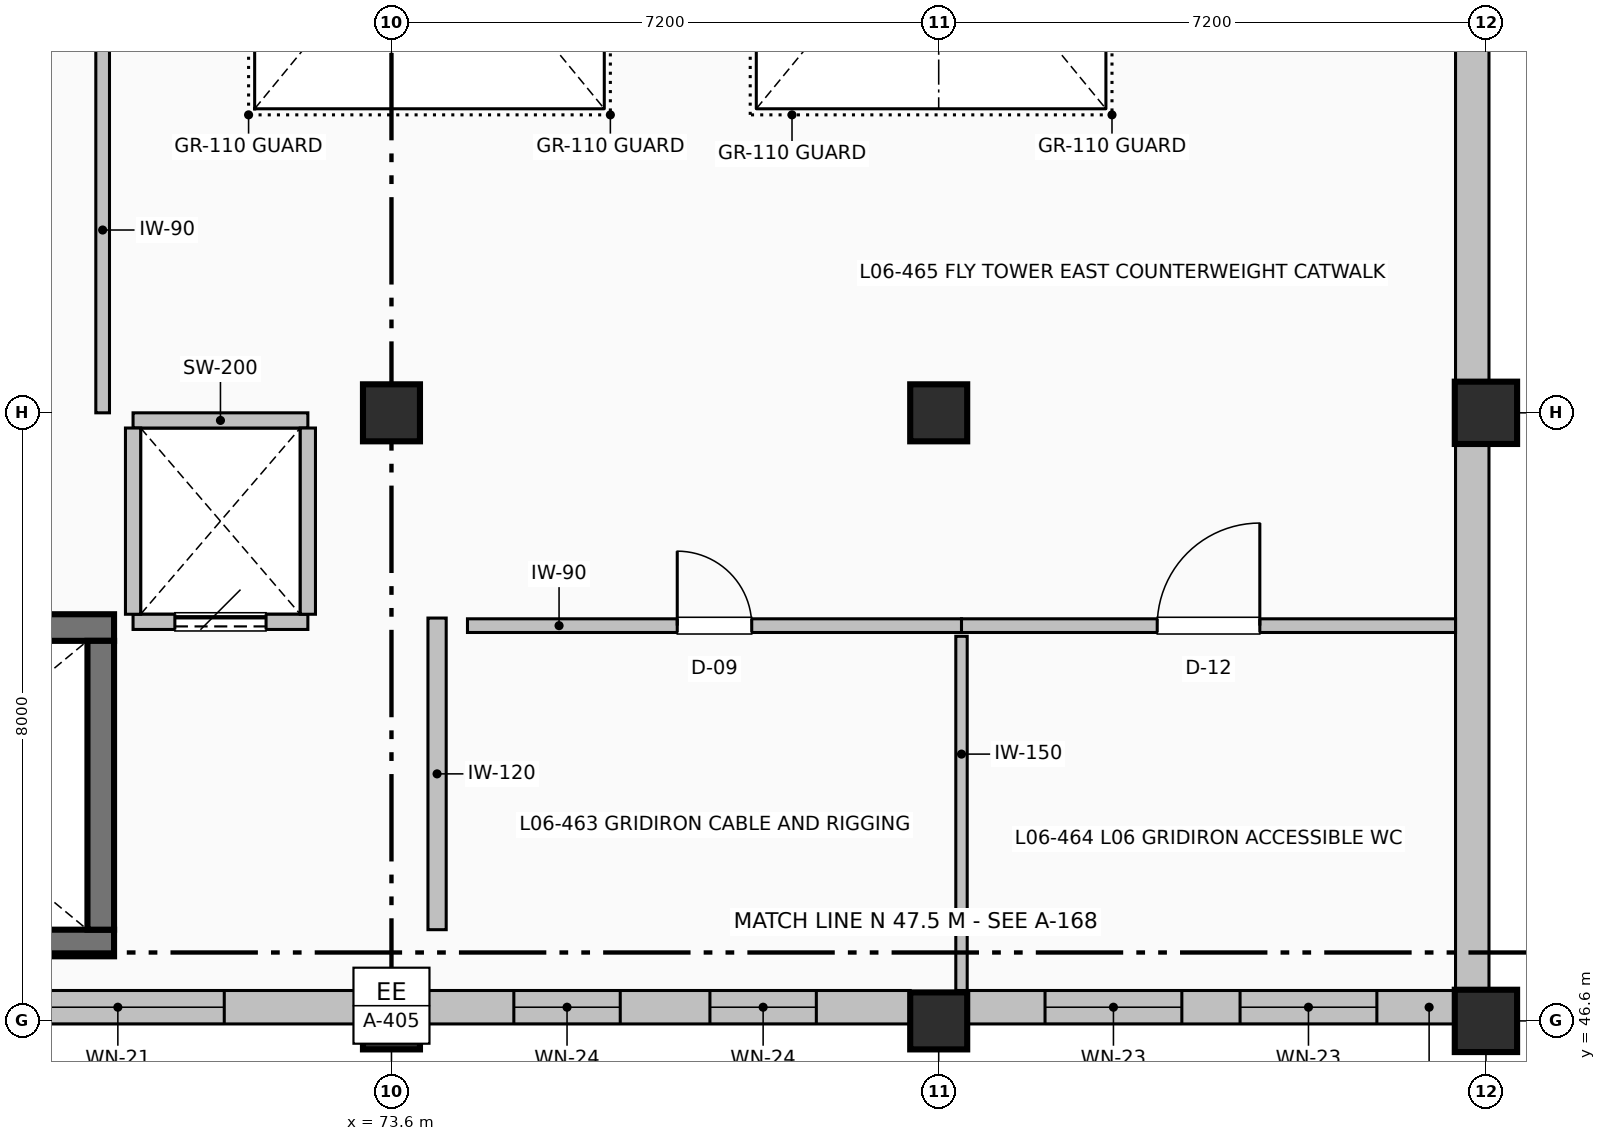
"""IFC4 building model, lengths in metres.
Left out: names, types, materials, properties, quantities, classifications, styles, units other than length and angle.
Written with IfcOpenShell. Run it as: python <this file> out.ifc"""

import sys

from ifc_helpers import new_model, si_unit, direction, frame, frame_2d, origin, origin_2d, place, context, subcontext, project, spatial, rectangle, extrude, element, fill, save


model = new_model("IFC4")
c1 = context("Model", 3, precision=1e-05, world=origin(), true_north=direction((0.0, 1.0)))
c2 = subcontext(c1, "Body", "Model", "MODEL_VIEW")
j1 = project(units=[si_unit("LENGTHUNIT", "METRE"), si_unit("PLANEANGLEUNIT", "RADIAN")], contexts=[c1])
p1 = place(None, origin())
s1 = spatial("IfcSite", under=j1, at=p1, CompositionType="ELEMENT")
p2 = place(p1, origin())
s2 = spatial("IfcBuilding", under=s1, at=p2, CompositionType="ELEMENT")
p3 = place(p2, frame((0.0, 0.0, 28.5)))
s3 = spatial("IfcBuildingStorey", under=s2, at=p3, CompositionType="ELEMENT", Elevation=28.5)
for number, where, z_axis, x_axis in (
    (1, (73.6, 46.6, 0.0), (0.0, 0.0, 1.0), (1.0, 0.0, 0.0)),
    (2, (73.6, 54.6, 0.0), (0.0, 0.0, 1.0), (1.0, 0.0, 0.0)),
    (3, (80.8, 46.6, 0.0), (0.0, 0.0, 1.0), (1.0, 0.0, 0.0)),
    (4, (80.8, 54.6, 0.0), (0.0, 0.0, 1.0), (1.0, 0.0, 0.0)),
):
    element("IfcColumn", number, at=place(p3, frame(where, z_axis=z_axis, x_axis=x_axis)), inside=s3, PredefinedType="COLUMN", context=c2, shape_type="SweptSolid", body=[
        extrude(rectangle(XDim=0.75, YDim=0.75, at=origin_2d()), origin(), (0.0, 0.0, 1.0), 5.1),
    ])
for number, where, z_axis, x_axis in (
    (5, (88.0, 46.6, 0.0), (0.0, 0.0, 1.0), (1.0, 0.0, 0.0)),
    (6, (88.0, 54.6, 0.0), (0.0, 0.0, 1.0), (1.0, 0.0, 0.0)),
):
    element("IfcColumn", number, at=place(p3, frame(where, z_axis=z_axis, x_axis=x_axis)), inside=s3, PredefinedType="COLUMN", context=c2, shape_type="SweptSolid", body=[
        extrude(rectangle(XDim=0.82, YDim=0.82, at=origin_2d()), origin(), (0.0, 0.0, 1.0), 5.1),
    ])
for number, where, z_axis, x_axis in (
    (7, (61.45, 47.625, 0.0), (0.0, 0.0, 1.0), (1.0, 0.0, 0.0)),
    (8, (69.95, 51.775, 0.0), (0.0, 0.0, 1.0), (-1.0, 0.0, 0.0)),
):
    element("IfcWall", number, at=place(p3, frame(where, z_axis=z_axis, x_axis=x_axis)), inside=s3, PredefinedType="SHEAR", context=c2, shape_type="SweptSolid", body=[
        extrude(rectangle(XDim=8.5, YDim=0.35, at=frame_2d((4.25, 0.0))), origin(), (0.0, 0.0, 1.0), 4.8),
    ])
p4 = place(p3, frame((69.775, 51.6, 0.0), z_axis=(0.0, 0.0, 1.0), x_axis=(0.0, -1.0, 0.0)))
e9 = element("IfcWall", 9, at=p4, inside=s3, PredefinedType="SHEAR", context=c2, shape_type="SweptSolid", body=[
    extrude(rectangle(XDim=3.8, YDim=0.35, at=frame_2d((1.9, 0.0))), origin(), (0.0, 0.0, 1.0), 4.8),
])
p5 = place(p3, frame((87.82, 62.09, 0.0), z_axis=(0.0, 0.0, 1.0), x_axis=(0.0, -1.0, 0.0)))
e10 = element("IfcWall", 10, at=p5, inside=s3, PredefinedType="SOLIDWALL", context=c2, shape_type="SweptSolid", body=[
    extrude(rectangle(XDim=7.08, YDim=0.44, at=frame_2d((3.54, 0.0))), origin(), (0.0, 0.0, 1.0), 4.192),
])
p6 = place(p3, frame((87.82, 54.19, 0.0), z_axis=(0.0, 0.0, 1.0), x_axis=(0.0, -1.0, 0.0)))
e11 = element("IfcWall", 11, at=p6, inside=s3, PredefinedType="SOLIDWALL", context=c2, shape_type="SweptSolid", body=[
    extrude(rectangle(XDim=7.18, YDim=0.44, at=frame_2d((3.59, 0.0))), origin(), (0.0, 0.0, 1.0), 4.192),
])
p7 = place(p3, frame((87.59, 46.78, 0.0), z_axis=(0.0, 0.0, 1.0), x_axis=(-1.0, 0.0, 0.0)))
e12 = element("IfcWall", 12, at=p7, inside=s3, PredefinedType="SOLIDWALL", context=c2, shape_type="SweptSolid", body=[
    extrude(rectangle(XDim=6.415, YDim=0.44, at=frame_2d((3.208, 0.0))), origin(), (0.0, 0.0, 1.0), 4.8),
])
p8 = place(p7, frame((1.025, 0.0, 1.05)))
e13 = element("IfcOpeningElement", 13, at=p8, cuts=e12, PredefinedType="OPENING", context=c2, shape_type="SweptSolid", body=[
    extrude(rectangle(XDim=1.8, YDim=1.25, at=frame_2d((0.9, 0.625))), frame((0.0, 0.23, 0.0), z_axis=(0.0, -1.0, 0.0), x_axis=(1.0, 0.0, 0.0)), (0.0, 0.0, 1.0), 0.46),
])
p9 = place(p7, frame((3.591, 0.0, 1.05)))
e14 = element("IfcOpeningElement", 14, at=p9, cuts=e12, PredefinedType="OPENING", context=c2, shape_type="SweptSolid", body=[
    extrude(rectangle(XDim=1.8, YDim=1.25, at=frame_2d((0.9, 0.625))), frame((0.0, 0.23, 0.0), z_axis=(0.0, -1.0, 0.0), x_axis=(1.0, 0.0, 0.0)), (0.0, 0.0, 1.0), 0.46),
])
p10 = place(p3, frame((80.425, 46.78, 0.0), z_axis=(0.0, 0.0, 1.0), x_axis=(-1.0, 0.0, 0.0)))
e15 = element("IfcWall", 15, at=p10, inside=s3, PredefinedType="SOLIDWALL", context=c2, shape_type="SweptSolid", body=[
    extrude(rectangle(XDim=6.45, YDim=0.44, at=frame_2d((3.225, 0.0))), origin(), (0.0, 0.0, 1.0), 4.8),
])
p11 = place(p10, frame((1.235, 0.0, 1.0)))
e16 = element("IfcOpeningElement", 16, at=p11, cuts=e15, PredefinedType="OPENING", context=c2, shape_type="SweptSolid", body=[
    extrude(rectangle(XDim=1.4, YDim=1.2, at=frame_2d((0.7, 0.6))), frame((0.0, 0.23, 0.0), z_axis=(0.0, -1.0, 0.0), x_axis=(1.0, 0.0, 0.0)), (0.0, 0.0, 1.0), 0.46),
])
p12 = place(p10, frame((3.815, 0.0, 1.0)))
e17 = element("IfcOpeningElement", 17, at=p12, cuts=e15, PredefinedType="OPENING", context=c2, shape_type="SweptSolid", body=[
    extrude(rectangle(XDim=1.4, YDim=1.2, at=frame_2d((0.7, 0.6))), frame((0.0, 0.23, 0.0), z_axis=(0.0, -1.0, 0.0), x_axis=(1.0, 0.0, 0.0)), (0.0, 0.0, 1.0), 0.46),
])
p13 = place(p3, frame((73.225, 46.78, 0.0), z_axis=(0.0, 0.0, 1.0), x_axis=(-1.0, 0.0, 0.0)))
e18 = element("IfcWall", 18, at=p13, inside=s3, PredefinedType="SOLIDWALL", context=c2, shape_type="SweptSolid", body=[
    extrude(rectangle(XDim=6.45, YDim=0.44, at=frame_2d((3.225, 0.0))), origin(), (0.0, 0.0, 1.0), 4.8),
])
p14 = place(p13, frame((1.825, 0.0, 1.05)))
e19 = element("IfcOpeningElement", 19, at=p14, cuts=e18, PredefinedType="OPENING", context=c2, shape_type="SweptSolid", body=[
    extrude(rectangle(XDim=2.8, YDim=1.35, at=frame_2d((1.4, 0.675))), frame((0.0, 0.23, 0.0), z_axis=(0.0, -1.0, 0.0), x_axis=(1.0, 0.0, 0.0)), (0.0, 0.0, 1.0), 0.46),
])
p15 = place(p3, frame((70.2, 51.85, 0.0), z_axis=(0.0, 0.0, 1.0), x_axis=(1.0, 0.0, 0.0)))
e20 = element("IfcWall", 20, at=p15, inside=s3, PredefinedType="PARTITIONING", context=c2, shape_type="SweptSolid", body=[
    extrude(rectangle(XDim=2.3, YDim=0.2, at=frame_2d((1.15, 0.0))), origin(), (0.0, 0.0, 1.0), 4.792),
])
p16 = place(p15, frame((0.55, 0.0, 0.0)))
e21 = element("IfcOpeningElement", 21, at=p16, cuts=e20, PredefinedType="OPENING", context=c2, shape_type="SweptSolid", body=[
    extrude(rectangle(XDim=1.2, YDim=2.15, at=frame_2d((0.6, 1.075))), frame((0.0, 0.11, 0.0), z_axis=(0.0, -1.0, 0.0), x_axis=(1.0, 0.0, 0.0)), (0.0, 0.0, 1.0), 0.22),
])
p17 = place(p3, frame((72.5, 54.5, 0.0), z_axis=(0.0, 0.0, 1.0), x_axis=(-1.0, 0.0, 0.0)))
e22 = element("IfcWall", 22, at=p17, inside=s3, PredefinedType="PARTITIONING", context=c2, shape_type="SweptSolid", body=[
    extrude(rectangle(XDim=2.3, YDim=0.2, at=frame_2d((1.15, 0.0))), origin(), (0.0, 0.0, 1.0), 4.792),
])
for number, where, z_axis, x_axis in (
    (23, (70.2, 51.95, 0.0), (0.0, 0.0, 1.0), (0.0, 1.0, 0.0)),
    (24, (72.5, 54.4, 0.0), (0.0, 0.0, 1.0), (0.0, -1.0, 0.0)),
):
    element("IfcWall", number, at=place(p3, frame(where, z_axis=z_axis, x_axis=x_axis)), inside=s3, PredefinedType="PARTITIONING", context=c2, shape_type="SweptSolid", body=[
        extrude(rectangle(XDim=2.45, YDim=0.2, at=frame_2d((1.225, 0.0))), origin(), (0.0, 0.0, 1.0), 4.792),
    ])
p18 = place(p3, frame((74.2, 51.9, 0.0), z_axis=(0.0, 0.0, 1.0), x_axis=(0.0, -1.0, 0.0)))
e25 = element("IfcWall", 25, at=p18, inside=s3, PredefinedType="PARTITIONING", context=c2, shape_type="SweptSolid", body=[
    extrude(rectangle(XDim=4.1, YDim=0.24, at=frame_2d((2.05, 0.0))), origin(), (0.0, 0.0, 1.0), 4.792),
])
p19 = place(p3, frame((69.8, 54.6, 0.0), z_axis=(0.0, 0.0, 1.0), x_axis=(0.0, 1.0, 0.0)))
e26 = element("IfcWall", 26, at=p19, inside=s3, PredefinedType="PARTITIONING", context=c2, shape_type="SweptSolid", body=[
    extrude(rectangle(XDim=11.6, YDim=0.18, at=frame_2d((5.8, 0.0))), origin(), (0.0, 0.0, 1.0), 4.792),
])
p20 = place(p19, frame((5.16, 0.0, 0.0)))
e27 = element("IfcOpeningElement", 27, at=p20, cuts=e26, PredefinedType="OPENING", context=c2, shape_type="SweptSolid", body=[
    extrude(rectangle(XDim=1.28, YDim=2.14, at=frame_2d((0.64, 1.07))), frame((0.0, 0.1, 0.0), z_axis=(0.0, -1.0, 0.0), x_axis=(1.0, 0.0, 0.0)), (0.0, 0.0, 1.0), 0.2),
])
p21 = place(p3, frame((74.6, 51.8, 0.0), z_axis=(0.0, 0.0, 1.0), x_axis=(1.0, 0.0, 0.0)))
e28 = element("IfcWall", 28, at=p21, inside=s3, PredefinedType="PARTITIONING", context=c2, shape_type="SweptSolid", body=[
    extrude(rectangle(XDim=6.5, YDim=0.18, at=frame_2d((3.25, 0.0))), origin(), (0.0, 0.0, 1.0), 4.185),
])
p22 = place(p21, frame((2.76, 0.0, 0.0)))
e29 = element("IfcOpeningElement", 29, at=p22, cuts=e28, PredefinedType="OPENING", context=c2, shape_type="SweptSolid", body=[
    extrude(rectangle(XDim=0.98, YDim=2.08, at=frame_2d((0.49, 1.04))), frame((0.0, 0.1, 0.0), z_axis=(0.0, -1.0, 0.0), x_axis=(1.0, 0.0, 0.0)), (0.0, 0.0, 1.0), 0.2),
])
p23 = place(p3, frame((81.1, 47.0, 0.0), z_axis=(0.0, 0.0, 1.0), x_axis=(0.0, 1.0, 0.0)))
e30 = element("IfcWall", 30, at=p23, inside=s3, PredefinedType="PARTITIONING", context=c2, shape_type="SweptSolid", body=[
    extrude(rectangle(XDim=4.66, YDim=0.15, at=frame_2d((2.33, 0.0))), origin(), (0.0, 0.0, 1.0), 4.792),
])
p24 = place(p3, frame((81.1, 51.8, 0.0), z_axis=(0.0, 0.0, 1.0), x_axis=(1.0, 0.0, 0.0)))
e31 = element("IfcWall", 31, at=p24, inside=s3, PredefinedType="PARTITIONING", context=c2, shape_type="SweptSolid", body=[
    extrude(rectangle(XDim=6.5, YDim=0.18, at=frame_2d((3.25, 0.0))), origin(), (0.0, 0.0, 1.0), 4.792),
])
p25 = place(p24, frame((2.575, 0.0, 0.0)))
e32 = element("IfcOpeningElement", 32, at=p25, cuts=e31, PredefinedType="OPENING", context=c2, shape_type="SweptSolid", body=[
    extrude(rectangle(XDim=1.35, YDim=2.16, at=frame_2d((0.675, 1.08))), frame((0.0, 0.1, 0.0), z_axis=(0.0, -1.0, 0.0), x_axis=(1.0, 0.0, 0.0)), (0.0, 0.0, 1.0), 0.2),
])
p26 = place(p8, origin())
e33 = element("IfcWindow", 33, at=p26, inside=s3, PartitioningType="SINGLE_PANEL", PredefinedType="WINDOW", context=c2, shape_type="SweptSolid", body=[
    extrude(rectangle(XDim=1.8, YDim=1.25, at=frame_2d((0.9, 0.625))), frame((0.0, 0.03, 0.0), z_axis=(0.0, -1.0, 0.0), x_axis=(1.0, 0.0, 0.0)), (0.0, 0.0, 1.0), 0.06),
])
fill(e13, e33)
p27 = place(p9, origin())
e34 = element("IfcWindow", 34, at=p27, inside=s3, PartitioningType="SINGLE_PANEL", PredefinedType="WINDOW", context=c2, shape_type="SweptSolid", body=[
    extrude(rectangle(XDim=1.8, YDim=1.25, at=frame_2d((0.9, 0.625))), frame((0.0, 0.03, 0.0), z_axis=(0.0, -1.0, 0.0), x_axis=(1.0, 0.0, 0.0)), (0.0, 0.0, 1.0), 0.06),
])
fill(e14, e34)
p28 = place(p11, origin())
e35 = element("IfcWindow", 35, at=p28, inside=s3, PartitioningType="SINGLE_PANEL", PredefinedType="WINDOW", context=c2, shape_type="SweptSolid", body=[
    extrude(rectangle(XDim=1.4, YDim=1.2, at=frame_2d((0.7, 0.6))), frame((0.0, 0.03, 0.0), z_axis=(0.0, -1.0, 0.0), x_axis=(1.0, 0.0, 0.0)), (0.0, 0.0, 1.0), 0.06),
])
fill(e16, e35)
p29 = place(p12, origin())
e36 = element("IfcWindow", 36, at=p29, inside=s3, PartitioningType="SINGLE_PANEL", PredefinedType="WINDOW", context=c2, shape_type="SweptSolid", body=[
    extrude(rectangle(XDim=1.4, YDim=1.2, at=frame_2d((0.7, 0.6))), frame((0.0, 0.03, 0.0), z_axis=(0.0, -1.0, 0.0), x_axis=(1.0, 0.0, 0.0)), (0.0, 0.0, 1.0), 0.06),
])
fill(e17, e36)
p30 = place(p14, origin())
e37 = element("IfcWindow", 37, at=p30, inside=s3, PartitioningType="SINGLE_PANEL", PredefinedType="WINDOW", context=c2, shape_type="SweptSolid", body=[
    extrude(rectangle(XDim=2.8, YDim=1.35, at=frame_2d((1.4, 0.675))), frame((0.0, 0.03, 0.0), z_axis=(0.0, -1.0, 0.0), x_axis=(1.0, 0.0, 0.0)), (0.0, 0.0, 1.0), 0.06),
])
fill(e19, e37)
p31 = place(p16, origin())
e38 = element("IfcDoor", 38, at=p31, inside=s3, OperationType="SLIDING_TO_LEFT", PredefinedType="DOOR", context=c2, shape_type="SweptSolid", body=[
    extrude(rectangle(XDim=1.2, YDim=2.15, at=frame_2d((0.6, 1.075))), frame((0.0, 0.025, 0.0), z_axis=(0.0, -1.0, 0.0), x_axis=(1.0, 0.0, 0.0)), (0.0, 0.0, 1.0), 0.05),
])
fill(e21, e38)
p32 = place(p22, origin())
e39 = element("IfcDoor", 39, at=p32, inside=s3, OperationType="SINGLE_SWING_LEFT", PredefinedType="DOOR", context=c2, shape_type="SweptSolid", body=[
    extrude(rectangle(XDim=0.98, YDim=2.08, at=frame_2d((0.49, 1.04))), frame((0.0, 0.025, 0.0), z_axis=(0.0, -1.0, 0.0), x_axis=(1.0, 0.0, 0.0)), (0.0, 0.0, 1.0), 0.05),
])
fill(e29, e39)
p33 = place(p25, origin())
e40 = element("IfcDoor", 40, at=p33, inside=s3, OperationType="SINGLE_SWING_RIGHT", PredefinedType="DOOR", context=c2, shape_type="SweptSolid", body=[
    extrude(rectangle(XDim=1.35, YDim=2.16, at=frame_2d((0.675, 1.08))), frame((0.0, 0.025, 0.0), z_axis=(0.0, -1.0, 0.0), x_axis=(1.0, 0.0, 0.0)), (0.0, 0.0, 1.0), 0.05),
])
fill(e32, e40)
save(model, sys.argv[1])
